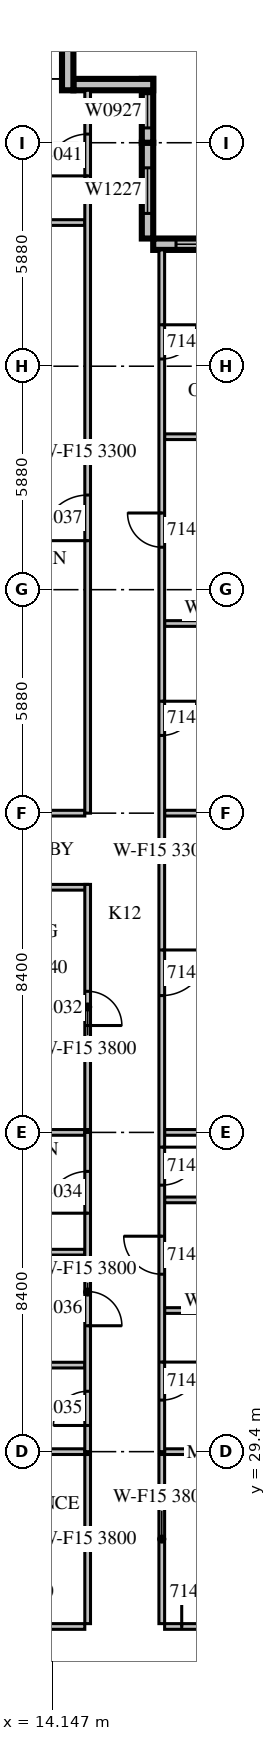
"""IFC4 building model, lengths in metres.
Left out: names, types, materials, properties, quantities, classifications, styles, units other than length and angle.
Written with IfcOpenShell. Run it as: python <this file> out.ifc"""

import sys

from ifc_helpers import new_model, si_unit, direction, frame, frame_2d, origin, place, context, subcontext, project, spatial, rectangle, extrude, source, transform, mapped, element, fill, save


model = new_model("IFC4")
c1 = context("Model", 3, precision=1e-05, world=origin(), true_north=direction((0.0, 1.0)))
c2 = subcontext(c1, "Body", "Model", "MODEL_VIEW")
j1 = project(units=[si_unit("LENGTHUNIT", "METRE"), si_unit("PLANEANGLEUNIT", "RADIAN")], contexts=[c1])
p1 = place(None, origin())
s1 = spatial("IfcSite", under=j1, at=p1, CompositionType="ELEMENT")
p2 = place(p1, origin())
s2 = spatial("IfcBuilding", under=s1, at=p2, CompositionType="ELEMENT")
p3 = place(p2, frame((0.0, 0.0, 69.9)))
s3 = spatial("IfcBuildingStorey", under=s2, at=p3, CompositionType="ELEMENT", Elevation=69.9)
m1 = source(origin(), c2, "Body", "SweptSolid", [
    extrude(rectangle(XDim=4.2, YDim=0.3, at=frame_2d((2.1, 0.0))), origin(), (0.0, 0.0, 1.0), 3.8),
])
p4 = place(p3, frame((21.0, 61.17, 0.0), z_axis=(0.0, 0.0, 1.0), x_axis=(-1.0, 0.0, 0.0)))
e1 = element("IfcWall", 1, at=p4, inside=s3, PredefinedType="STANDARD", context=c2, shape_type="MappedRepresentation", body=[
    mapped(m1, transform((0.0, 0.0, 0.0), scale=1.0)),
])
m2 = source(origin(), c2, "Body", "SweptSolid", [
    extrude(rectangle(XDim=3.0, YDim=2.7, at=frame_2d((1.5, 1.35))), frame((0.0, 0.16, 0.0), z_axis=(0.0, -1.0, 0.0), x_axis=(1.0, 0.0, 0.0)), (0.0, 0.0, 1.0), 0.32),
])
p5 = place(p4, frame((0.6, 0.0, 0.6)))
e2 = element("IfcOpeningElement", 2, at=p5, cuts=e1, PredefinedType="OPENING", context=c2, shape_type="MappedRepresentation", body=[
    mapped(m2, transform((0.0, 0.0, 0.0), scale=1.0)),
])
m3 = source(origin(), c2, "Body", "SweptSolid", [
    extrude(rectangle(XDim=2.52, YDim=0.3, at=frame_2d((1.26, 0.0))), origin(), (0.0, 0.0, 1.0), 3.8),
])
p6 = place(p3, frame((16.65, 61.32, 0.0), z_axis=(0.0, 0.0, 1.0), x_axis=(0.0, 1.0, 0.0)))
e3 = element("IfcWall", 3, at=p6, inside=s3, PredefinedType="STANDARD", context=c2, shape_type="MappedRepresentation", body=[
    mapped(m3, transform((0.0, 0.0, 0.0), scale=1.0)),
])
m4 = source(origin(), c2, "Body", "SweptSolid", [
    extrude(rectangle(XDim=1.2, YDim=2.7, at=frame_2d((0.6, 1.35))), frame((0.0, 0.16, 0.0), z_axis=(0.0, -1.0, 0.0), x_axis=(1.0, 0.0, 0.0)), (0.0, 0.0, 1.0), 0.32),
])
p7 = place(p6, frame((0.66, 0.0, 0.6)))
e4 = element("IfcOpeningElement", 4, at=p7, cuts=e3, PredefinedType="OPENING", context=c2, shape_type="MappedRepresentation", body=[
    mapped(m4, transform((0.0, 0.0, 0.0), scale=1.0)),
])
m5 = source(origin(), c2, "Body", "SweptSolid", [
    extrude(rectangle(XDim=1.68, YDim=0.3, at=frame_2d((0.84, 0.0))), origin(), (0.0, 0.0, 1.0), 3.8),
])
p8 = place(p3, frame((16.65, 63.84, 0.0), z_axis=(0.0, 0.0, 1.0), x_axis=(0.0, 1.0, 0.0)))
e5 = element("IfcWall", 5, at=p8, inside=s3, PredefinedType="STANDARD", context=c2, shape_type="MappedRepresentation", body=[
    mapped(m5, transform((0.0, 0.0, 0.0), scale=1.0)),
])
m6 = source(origin(), c2, "Body", "SweptSolid", [
    extrude(rectangle(XDim=0.9, YDim=2.7, at=frame_2d((0.45, 1.35))), frame((0.0, 0.16, 0.0), z_axis=(0.0, -1.0, 0.0), x_axis=(1.0, 0.0, 0.0)), (0.0, 0.0, 1.0), 0.32),
])
p9 = place(p8, frame((0.39, 0.0, 0.6)))
e6 = element("IfcOpeningElement", 6, at=p9, cuts=e5, PredefinedType="OPENING", context=c2, shape_type="MappedRepresentation", body=[
    mapped(m6, transform((0.0, 0.0, 0.0), scale=1.0)),
])
p10 = place(p3, frame((16.8, 65.37, 0.0), z_axis=(0.0, 0.0, 1.0), x_axis=(-1.0, 0.0, 0.0)))
e7 = element("IfcWall", 7, at=p10, inside=s3, PredefinedType="STANDARD", context=c2, shape_type="SweptSolid", body=[
    extrude(rectangle(XDim=2.1, YDim=0.3, at=frame_2d((1.05, 0.0))), origin(), (0.0, 0.0, 1.0), 3.8),
])
m7 = source(origin(), c2, "Body", "SweptSolid", [
    extrude(rectangle(XDim=1.2, YDim=0.3, at=frame_2d((0.6, 0.0))), origin(), (0.0, 0.0, 1.0), 3.8),
])
p11 = place(p3, frame((14.55, 65.22, 0.0), z_axis=(0.0, 0.0, 1.0), x_axis=(0.0, 1.0, 0.0)))
e8 = element("IfcWall", 8, at=p11, inside=s3, PredefinedType="STANDARD", context=c2, shape_type="MappedRepresentation", body=[
    mapped(m7, transform((0.0, 0.0, 0.0), scale=1.0)),
])
m8 = source(origin(), c2, "Body", "SweptSolid", [
    extrude(rectangle(XDim=4.295, YDim=0.15, at=frame_2d((2.147, 0.0))), origin(), (0.0, 0.0, 1.0), 3.8),
])
p12 = place(p3, frame((10.705, 24.8, 0.0), z_axis=(0.0, 0.0, 1.0), x_axis=(1.0, 0.0, 0.0)))
e9 = element("IfcWall", 9, at=p12, inside=s3, PredefinedType="PARTITIONING", context=c2, shape_type="MappedRepresentation", body=[
    mapped(m8, transform((0.0, 0.0, 0.0), scale=1.0)),
])
m9 = source(origin(), c2, "Body", "SweptSolid", [
    extrude(rectangle(XDim=0.9, YDim=2.1, at=frame_2d((0.45, 1.05))), frame((0.0, 0.085, 0.0), z_axis=(0.0, -1.0, 0.0), x_axis=(1.0, 0.0, 0.0)), (0.0, 0.0, 1.0), 0.17),
])
p13 = place(p12, frame((2.283, 0.0, 0.0)))
e10 = element("IfcOpeningElement", 10, at=p13, cuts=e9, PredefinedType="OPENING", context=c2, shape_type="MappedRepresentation", body=[
    mapped(m9, transform((0.0, 0.0, 0.0), scale=1.0)),
])
m10 = source(origin(), c2, "Body", "SweptSolid", [
    extrude(rectangle(XDim=3.6, YDim=0.15, at=frame_2d((1.8, 0.0))), origin(), (0.0, 0.0, 1.0), 3.8),
])
p14 = place(p3, frame((17.1, 24.8, 0.0), z_axis=(0.0, 0.0, 1.0), x_axis=(1.0, 0.0, 0.0)))
e11 = element("IfcWall", 11, at=p14, inside=s3, PredefinedType="PARTITIONING", context=c2, shape_type="MappedRepresentation", body=[
    mapped(m10, transform((0.0, 0.0, 0.0), scale=1.0)),
])
p15 = place(p14, frame((0.45, 0.0, 0.0)))
e12 = element("IfcOpeningElement", 12, at=p15, cuts=e11, PredefinedType="OPENING", context=c2, shape_type="MappedRepresentation", body=[
    mapped(m9, transform((0.0, 0.0, 0.0), scale=1.0)),
])
m11 = source(origin(), c2, "Body", "SweptSolid", [
    extrude(rectangle(XDim=4.45, YDim=0.15, at=frame_2d((2.225, 0.0))), origin(), (0.0, 0.0, 1.0), 3.8),
])
for number, where, z_axis, x_axis in (
    (13, (15.075, 24.875, 0.0), (0.0, 0.0, 1.0), (0.0, 1.0, 0.0)),
    (14, (17.025, 29.325, 0.0), (0.0, 0.0, 1.0), (0.0, -1.0, 0.0)),
):
    element("IfcWall", number, at=place(p3, frame(where, z_axis=z_axis, x_axis=x_axis)), inside=s3, PredefinedType="PARTITIONING", context=c2, shape_type="MappedRepresentation", body=[
        mapped(m11, transform((0.0, 0.0, 0.0), scale=1.0)),
    ])
m12 = source(origin(), c2, "Body", "SweptSolid", [
    extrude(rectangle(XDim=3.901, YDim=0.15, at=frame_2d((1.95, 0.0))), origin(), (0.0, 0.0, 1.0), 3.8),
])
p16 = place(p3, frame((15.0, 29.4, 0.0), z_axis=(0.0, 0.0, 1.0), x_axis=(-1.0, 0.0, 0.0)))
e15 = element("IfcWall", 15, at=p16, inside=s3, PredefinedType="PARTITIONING", context=c2, shape_type="MappedRepresentation", body=[
    mapped(m12, transform((0.0, 0.0, 0.0), scale=1.0)),
])
m13 = source(origin(), c2, "Body", "SweptSolid", [
    extrude(rectangle(XDim=2.701, YDim=0.15, at=frame_2d((1.351, 0.0))), origin(), (0.0, 0.0, 1.0), 3.8),
])
p17 = place(p3, frame((19.801, 29.4, 0.0), z_axis=(0.0, 0.0, 1.0), x_axis=(-1.0, 0.0, 0.0)))
e16 = element("IfcWall", 16, at=p17, inside=s3, PredefinedType="PARTITIONING", context=c2, shape_type="MappedRepresentation", body=[
    mapped(m13, transform((0.0, 0.0, 0.0), scale=1.0)),
])
m14 = source(origin(), c2, "Body", "SweptSolid", [
    extrude(rectangle(XDim=3.975, YDim=0.15, at=frame_2d((1.988, 0.0))), origin(), (0.0, 0.0, 1.0), 3.8),
])
p18 = place(p3, frame((15.075, 44.25, 0.0), z_axis=(0.0, 0.0, 1.0), x_axis=(-1.0, 0.0, 0.0)))
e17 = element("IfcWall", 17, at=p18, inside=s3, PredefinedType="PARTITIONING", context=c2, shape_type="MappedRepresentation", body=[
    mapped(m14, transform((0.0, 0.0, 0.0), scale=1.0)),
])
m15 = source(origin(), c2, "Body", "SweptSolid", [
    extrude(rectangle(XDim=6.45, YDim=0.15, at=frame_2d((3.225, 0.0))), origin(), (0.0, 0.0, 1.0), 3.8),
])
p19 = place(p3, frame((15.075, 37.875, 0.0), z_axis=(0.0, 0.0, 1.0), x_axis=(0.0, 1.0, 0.0)))
e18 = element("IfcWall", 18, at=p19, inside=s3, PredefinedType="PARTITIONING", context=c2, shape_type="MappedRepresentation", body=[
    mapped(m15, transform((0.0, 0.0, 0.0), scale=1.0)),
])
p20 = place(p19, frame((2.737, 0.0, 0.0)))
e19 = element("IfcOpeningElement", 19, at=p20, cuts=e18, PredefinedType="OPENING", context=c2, shape_type="MappedRepresentation", body=[
    mapped(m9, transform((0.0, 0.0, 0.0), scale=1.0)),
])
for number, where, z_axis, x_axis in (
    (20, (15.0, 31.677, 0.0), (0.0, 0.0, 1.0), (-1.0, 0.0, 0.0)),
    (21, (15.0, 34.648, 0.0), (0.0, 0.0, 1.0), (-1.0, 0.0, 0.0)),
):
    element("IfcWall", number, at=place(p3, frame(where, z_axis=z_axis, x_axis=x_axis)), inside=s3, PredefinedType="PARTITIONING", context=c2, shape_type="MappedRepresentation", body=[
        mapped(m8, transform((0.0, 0.0, 0.0), scale=1.0)),
    ])
p21 = place(p3, frame((15.0, 37.8, 0.0), z_axis=(0.0, 0.0, 1.0), x_axis=(-1.0, 0.0, 0.0)))
e22 = element("IfcWall", 22, at=p21, inside=s3, PredefinedType="PARTITIONING", context=c2, shape_type="MappedRepresentation", body=[
    mapped(m12, transform((0.0, 0.0, 0.0), scale=1.0)),
])
m16 = source(origin(), c2, "Body", "SweptSolid", [
    extrude(rectangle(XDim=3.75, YDim=0.15, at=frame_2d((1.875, 0.0))), origin(), (0.0, 0.0, 1.0), 3.8),
])
for number, where, z_axis, x_axis in (
    (23, (15.0, 46.2, 0.0), (0.0, 0.0, 1.0), (-1.0, 0.0, 0.0)),
    (24, (15.0, 61.74, 0.0), (0.0, 0.0, 1.0), (-1.0, 0.0, 0.0)),
):
    element("IfcWall", number, at=place(p3, frame(where, z_axis=z_axis, x_axis=x_axis)), inside=s3, PredefinedType="PARTITIONING", context=c2, shape_type="MappedRepresentation", body=[
        mapped(m16, transform((0.0, 0.0, 0.0), scale=1.0)),
    ])
for number, where, z_axis, x_axis in (
    (25, (17.1, 33.113, 0.0), (0.0, 0.0, 1.0), (1.0, 0.0, 0.0)),
    (26, (17.1, 36.024, 0.0), (0.0, 0.0, 1.0), (1.0, 0.0, 0.0)),
):
    element("IfcWall", number, at=place(p3, frame(where, z_axis=z_axis, x_axis=x_axis)), inside=s3, PredefinedType="PARTITIONING", context=c2, shape_type="MappedRepresentation", body=[
        mapped(m10, transform((0.0, 0.0, 0.0), scale=1.0)),
    ])
m17 = source(origin(), c2, "Body", "SweptSolid", [
    extrude(rectangle(XDim=3.6, YDim=0.15, at=frame_2d((1.8, 0.0))), origin(), (0.0, 0.0, 1.0), 2.8),
])
p22 = place(p3, frame((17.1, 51.19, 0.0), z_axis=(0.0, 0.0, 1.0), x_axis=(1.0, 0.0, 0.0)))
e27 = element("IfcWall", 27, at=p22, inside=s3, PredefinedType="PARTITIONING", context=c2, shape_type="MappedRepresentation", body=[
    mapped(m17, transform((0.0, 0.0, 0.0), scale=1.0)),
])
p23 = place(p3, frame((17.1, 56.105, 0.0), z_axis=(0.0, 0.0, 1.0), x_axis=(1.0, 0.0, 0.0)))
e28 = element("IfcWall", 28, at=p23, inside=s3, PredefinedType="PARTITIONING", context=c2, shape_type="MappedRepresentation", body=[
    mapped(m10, transform((0.0, 0.0, 0.0), scale=1.0)),
])
for number, where, z_axis, x_axis in (
    (29, (19.801, 37.8, 0.0), (0.0, 0.0, 1.0), (-1.0, 0.0, 0.0)),
    (30, (19.801, 46.2, 0.0), (0.0, 0.0, 1.0), (-1.0, 0.0, 0.0)),
):
    element("IfcWall", number, at=place(p3, frame(where, z_axis=z_axis, x_axis=x_axis)), inside=s3, PredefinedType="PARTITIONING", context=c2, shape_type="MappedRepresentation", body=[
        mapped(m13, transform((0.0, 0.0, 0.0), scale=1.0)),
    ])
m18 = source(origin(), c2, "Body", "SweptSolid", [
    extrude(rectangle(XDim=8.4, YDim=0.15, at=frame_2d((4.2, 0.0))), origin(), (0.0, 0.0, 1.0), 3.8),
])
p24 = place(p3, frame((15.075, 29.4, 0.0), z_axis=(0.0, 0.0, 1.0), x_axis=(0.0, 1.0, 0.0)))
e31 = element("IfcWall", 31, at=p24, inside=s3, PredefinedType="PARTITIONING", context=c2, shape_type="MappedRepresentation", body=[
    mapped(m18, transform((0.0, 0.0, 0.0), scale=1.0)),
])
m19 = source(origin(), c2, "Body", "SweptSolid", [
    extrude(rectangle(XDim=1.1, YDim=2.1, at=frame_2d((0.55, 1.05))), frame((0.0, 0.085, 0.0), z_axis=(0.0, -1.0, 0.0), x_axis=(1.0, 0.0, 0.0)), (0.0, 0.0, 1.0), 0.17),
])
p25 = place(p24, frame((6.274, 0.0, 0.0)))
e32 = element("IfcOpeningElement", 32, at=p25, cuts=e31, PredefinedType="OPENING", context=c2, shape_type="MappedRepresentation", body=[
    mapped(m19, transform((0.0, 0.0, 0.0), scale=1.0)),
])
p26 = place(p24, frame((0.689, 0.0, 0.0)))
e33 = element("IfcOpeningElement", 33, at=p26, cuts=e31, PredefinedType="OPENING", context=c2, shape_type="MappedRepresentation", body=[
    mapped(m9, transform((0.0, 0.0, 0.0), scale=1.0)),
])
p27 = place(p24, frame((3.313, 0.0, 0.0)))
e34 = element("IfcOpeningElement", 34, at=p27, cuts=e31, PredefinedType="OPENING", context=c2, shape_type="MappedRepresentation", body=[
    mapped(m9, transform((0.0, 0.0, 0.0), scale=1.0)),
])
m20 = source(origin(), c2, "Body", "SweptSolid", [
    extrude(rectangle(XDim=19.02, YDim=0.15, at=frame_2d((9.51, 0.0))), origin(), (0.0, 0.0, 1.0), 3.3),
])
p28 = place(p3, frame((15.075, 46.2, 0.0), z_axis=(0.0, 0.0, 1.0), x_axis=(0.0, 1.0, 0.0)))
e35 = element("IfcWall", 35, at=p28, inside=s3, PredefinedType="PARTITIONING", context=c2, shape_type="MappedRepresentation", body=[
    mapped(m20, transform((0.0, 0.0, 0.0), scale=1.0)),
])
m21 = source(origin(), c2, "Body", "SweptSolid", [
    extrude(rectangle(XDim=1.2, YDim=2.1, at=frame_2d((0.6, 1.05))), frame((0.0, 0.085, 0.0), z_axis=(0.0, -1.0, 0.0), x_axis=(1.0, 0.0, 0.0)), (0.0, 0.0, 1.0), 0.17),
])
p29 = place(p28, frame((7.17, 0.0, 0.0)))
e36 = element("IfcOpeningElement", 36, at=p29, cuts=e35, PredefinedType="OPENING", context=c2, shape_type="MappedRepresentation", body=[
    mapped(m21, transform((0.0, 0.0, 0.0), scale=1.0)),
])
p30 = place(p28, frame((16.767, 0.0, 0.0)))
e37 = element("IfcOpeningElement", 37, at=p30, cuts=e35, PredefinedType="OPENING", context=c2, shape_type="MappedRepresentation", body=[
    mapped(m19, transform((0.0, 0.0, 0.0), scale=1.0)),
])
m22 = source(origin(), c2, "Body", "SweptSolid", [
    extrude(rectangle(XDim=31.62, YDim=0.15, at=frame_2d((15.81, 0.0))), origin(), (0.0, 0.0, 1.0), 3.3),
])
p31 = place(p3, frame((17.025, 61.02, 0.0), z_axis=(0.0, 0.0, 1.0), x_axis=(0.0, -1.0, 0.0)))
e38 = element("IfcWall", 38, at=p31, inside=s3, PredefinedType="PARTITIONING", context=c2, shape_type="MappedRepresentation", body=[
    mapped(m22, transform((0.0, 0.0, 0.0), scale=1.0)),
])
m23 = source(origin(), c2, "Body", "SweptSolid", [
    extrude(rectangle(XDim=1.0, YDim=2.1, at=frame_2d((0.5, 1.05))), frame((0.0, 0.085, 0.0), z_axis=(0.0, -1.0, 0.0), x_axis=(1.0, 0.0, 0.0)), (0.0, 0.0, 1.0), 0.17),
])
p32 = place(p31, frame((29.263, 0.0, 0.0)))
e39 = element("IfcOpeningElement", 39, at=p32, cuts=e38, PredefinedType="OPENING", context=c2, shape_type="MappedRepresentation", body=[
    mapped(m23, transform((0.0, 0.0, 0.0), scale=1.0)),
])
p33 = place(p31, frame((25.951, 0.0, 0.0)))
e40 = element("IfcOpeningElement", 40, at=p33, cuts=e38, PredefinedType="OPENING", context=c2, shape_type="MappedRepresentation", body=[
    mapped(m23, transform((0.0, 0.0, 0.0), scale=1.0)),
])
p34 = place(p31, frame((23.608, 0.0, 0.0)))
e41 = element("IfcOpeningElement", 41, at=p34, cuts=e38, PredefinedType="OPENING", context=c2, shape_type="MappedRepresentation", body=[
    mapped(m23, transform((0.0, 0.0, 0.0), scale=1.0)),
])
p35 = place(p31, frame((18.42, 0.0, 0.0)))
e42 = element("IfcOpeningElement", 42, at=p35, cuts=e38, PredefinedType="OPENING", context=c2, shape_type="MappedRepresentation", body=[
    mapped(m21, transform((0.0, 0.0, 0.0), scale=1.0)),
])
p36 = place(p31, frame((11.875, 0.0, 0.0)))
e43 = element("IfcOpeningElement", 43, at=p36, cuts=e38, PredefinedType="OPENING", context=c2, shape_type="MappedRepresentation", body=[
    mapped(m9, transform((0.0, 0.0, 0.0), scale=1.0)),
])
p37 = place(p31, frame((6.923, 0.0, 0.0)))
e44 = element("IfcOpeningElement", 44, at=p37, cuts=e38, PredefinedType="OPENING", context=c2, shape_type="MappedRepresentation", body=[
    mapped(m9, transform((0.0, 0.0, 0.0), scale=1.0)),
])
p38 = place(p31, frame((1.97, 0.0, 0.0)))
e45 = element("IfcOpeningElement", 45, at=p38, cuts=e38, PredefinedType="OPENING", context=c2, shape_type="MappedRepresentation", body=[
    mapped(m9, transform((0.0, 0.0, 0.0), scale=1.0)),
])
m24 = source(origin(), c2, "Body", "SweptSolid", [
    extrude(rectangle(XDim=3.0, YDim=2.7, at=frame_2d((1.5, 1.35))), frame((0.0, 0.03, 0.0), z_axis=(0.0, -1.0, 0.0), x_axis=(1.0, 0.0, 0.0)), (0.0, 0.0, 1.0), 0.06),
])
p39 = place(p5, origin())
e46 = element("IfcWindow", 46, at=p39, inside=s3, PartitioningType="SINGLE_PANEL", PredefinedType="WINDOW", context=c2, shape_type="MappedRepresentation", body=[
    mapped(m24, transform((0.0, 0.0, 0.0), scale=1.0)),
])
fill(e2, e46)
m25 = source(origin(), c2, "Body", "SweptSolid", [
    extrude(rectangle(XDim=1.2, YDim=2.7, at=frame_2d((0.6, 1.35))), frame((0.0, 0.03, 0.0), z_axis=(0.0, -1.0, 0.0), x_axis=(1.0, 0.0, 0.0)), (0.0, 0.0, 1.0), 0.06),
])
p40 = place(p7, origin())
e47 = element("IfcWindow", 47, at=p40, inside=s3, PartitioningType="SINGLE_PANEL", PredefinedType="WINDOW", context=c2, shape_type="MappedRepresentation", body=[
    mapped(m25, transform((0.0, 0.0, 0.0), scale=1.0)),
])
fill(e4, e47)
m26 = source(origin(), c2, "Body", "SweptSolid", [
    extrude(rectangle(XDim=0.9, YDim=2.7, at=frame_2d((0.45, 1.35))), frame((0.0, 0.03, 0.0), z_axis=(0.0, -1.0, 0.0), x_axis=(1.0, 0.0, 0.0)), (0.0, 0.0, 1.0), 0.06),
])
p41 = place(p9, origin())
e48 = element("IfcWindow", 48, at=p41, inside=s3, PartitioningType="SINGLE_PANEL", PredefinedType="WINDOW", context=c2, shape_type="MappedRepresentation", body=[
    mapped(m26, transform((0.0, 0.0, 0.0), scale=1.0)),
])
fill(e6, e48)
m27 = source(origin(), c2, "Body", "SweptSolid", [
    extrude(rectangle(XDim=0.9, YDim=2.1, at=frame_2d((0.45, 1.05))), frame((0.0, 0.025, 0.0), z_axis=(0.0, -1.0, 0.0), x_axis=(1.0, 0.0, 0.0)), (0.0, 0.0, 1.0), 0.05),
])
p42 = place(p15, origin())
e49 = element("IfcDoor", 49, at=p42, inside=s3, OperationType="SINGLE_SWING_LEFT", PredefinedType="DOOR", context=c2, shape_type="MappedRepresentation", body=[
    mapped(m27, transform((0.0, 0.0, 0.0), scale=1.0)),
])
fill(e12, e49)
p43 = place(p20, origin())
e50 = element("IfcDoor", 50, at=p43, inside=s3, OperationType="SINGLE_SWING_RIGHT", PredefinedType="DOOR", context=c2, shape_type="MappedRepresentation", body=[
    mapped(m27, transform((0.0, 0.0, 0.0), scale=1.0)),
])
fill(e19, e50)
m28 = source(origin(), c2, "Body", "SweptSolid", [
    extrude(rectangle(XDim=1.1, YDim=2.1, at=frame_2d((0.55, 1.05))), frame((0.0, 0.025, 0.0), z_axis=(0.0, -1.0, 0.0), x_axis=(1.0, 0.0, 0.0)), (0.0, 0.0, 1.0), 0.05),
])
p44 = place(p25, origin())
e51 = element("IfcDoor", 51, at=p44, inside=s3, OperationType="SINGLE_SWING_LEFT", PredefinedType="DOOR", context=c2, shape_type="MappedRepresentation", body=[
    mapped(m28, transform((0.0, 0.0, 0.0), scale=1.0)),
])
fill(e32, e51)
p45 = place(p26, origin())
e52 = element("IfcDoor", 52, at=p45, inside=s3, OperationType="SINGLE_SWING_LEFT", PredefinedType="DOOR", context=c2, shape_type="MappedRepresentation", body=[
    mapped(m27, transform((0.0, 0.0, 0.0), scale=1.0)),
])
fill(e33, e52)
p46 = place(p27, origin())
e53 = element("IfcDoor", 53, at=p46, inside=s3, OperationType="SINGLE_SWING_RIGHT", PredefinedType="DOOR", context=c2, shape_type="MappedRepresentation", body=[
    mapped(m27, transform((0.0, 0.0, 0.0), scale=1.0)),
])
fill(e34, e53)
m29 = source(origin(), c2, "Body", "SweptSolid", [
    extrude(rectangle(XDim=1.2, YDim=2.1, at=frame_2d((0.6, 1.05))), frame((0.0, 0.025, 0.0), z_axis=(0.0, -1.0, 0.0), x_axis=(1.0, 0.0, 0.0)), (0.0, 0.0, 1.0), 0.05),
])
p47 = place(p29, origin())
e54 = element("IfcDoor", 54, at=p47, inside=s3, OperationType="SINGLE_SWING_LEFT", PredefinedType="DOOR", context=c2, shape_type="MappedRepresentation", body=[
    mapped(m29, transform((0.0, 0.0, 0.0), scale=1.0)),
])
fill(e36, e54)
p48 = place(p30, origin())
e55 = element("IfcDoor", 55, at=p48, inside=s3, OperationType="SINGLE_SWING_LEFT", PredefinedType="DOOR", context=c2, shape_type="MappedRepresentation", body=[
    mapped(m28, transform((0.0, 0.0, 0.0), scale=1.0)),
])
fill(e37, e55)
m30 = source(origin(), c2, "Body", "SweptSolid", [
    extrude(rectangle(XDim=1.0, YDim=2.1, at=frame_2d((0.5, 1.05))), frame((0.0, 0.025, 0.0), z_axis=(0.0, -1.0, 0.0), x_axis=(1.0, 0.0, 0.0)), (0.0, 0.0, 1.0), 0.05),
])
p49 = place(p32, origin())
e56 = element("IfcDoor", 56, at=p49, inside=s3, OperationType="SINGLE_SWING_LEFT", PredefinedType="DOOR", context=c2, shape_type="MappedRepresentation", body=[
    mapped(m30, transform((0.0, 0.0, 0.0), scale=1.0)),
])
fill(e39, e56)
p50 = place(p33, origin())
e57 = element("IfcDoor", 57, at=p50, inside=s3, OperationType="SINGLE_SWING_RIGHT", PredefinedType="DOOR", context=c2, shape_type="MappedRepresentation", body=[
    mapped(m30, transform((0.0, 0.0, 0.0), scale=1.0)),
])
fill(e40, e57)
p51 = place(p34, origin())
e58 = element("IfcDoor", 58, at=p51, inside=s3, OperationType="SINGLE_SWING_LEFT", PredefinedType="DOOR", context=c2, shape_type="MappedRepresentation", body=[
    mapped(m30, transform((0.0, 0.0, 0.0), scale=1.0)),
])
fill(e41, e58)
p52 = place(p35, origin())
e59 = element("IfcDoor", 59, at=p52, inside=s3, OperationType="SINGLE_SWING_LEFT", PredefinedType="DOOR", context=c2, shape_type="MappedRepresentation", body=[
    mapped(m29, transform((0.0, 0.0, 0.0), scale=1.0)),
])
fill(e42, e59)
p53 = place(p36, origin())
e60 = element("IfcDoor", 60, at=p53, inside=s3, OperationType="SINGLE_SWING_LEFT", PredefinedType="DOOR", context=c2, shape_type="MappedRepresentation", body=[
    mapped(m27, transform((0.0, 0.0, 0.0), scale=1.0)),
])
fill(e43, e60)
p54 = place(p37, origin())
e61 = element("IfcDoor", 61, at=p54, inside=s3, OperationType="SINGLE_SWING_RIGHT", PredefinedType="DOOR", context=c2, shape_type="MappedRepresentation", body=[
    mapped(m27, transform((0.0, 0.0, 0.0), scale=1.0)),
])
fill(e44, e61)
p55 = place(p38, origin())
e62 = element("IfcDoor", 62, at=p55, inside=s3, OperationType="SINGLE_SWING_LEFT", PredefinedType="DOOR", context=c2, shape_type="MappedRepresentation", body=[
    mapped(m27, transform((0.0, 0.0, 0.0), scale=1.0)),
])
fill(e45, e62)
save(model, sys.argv[1])
